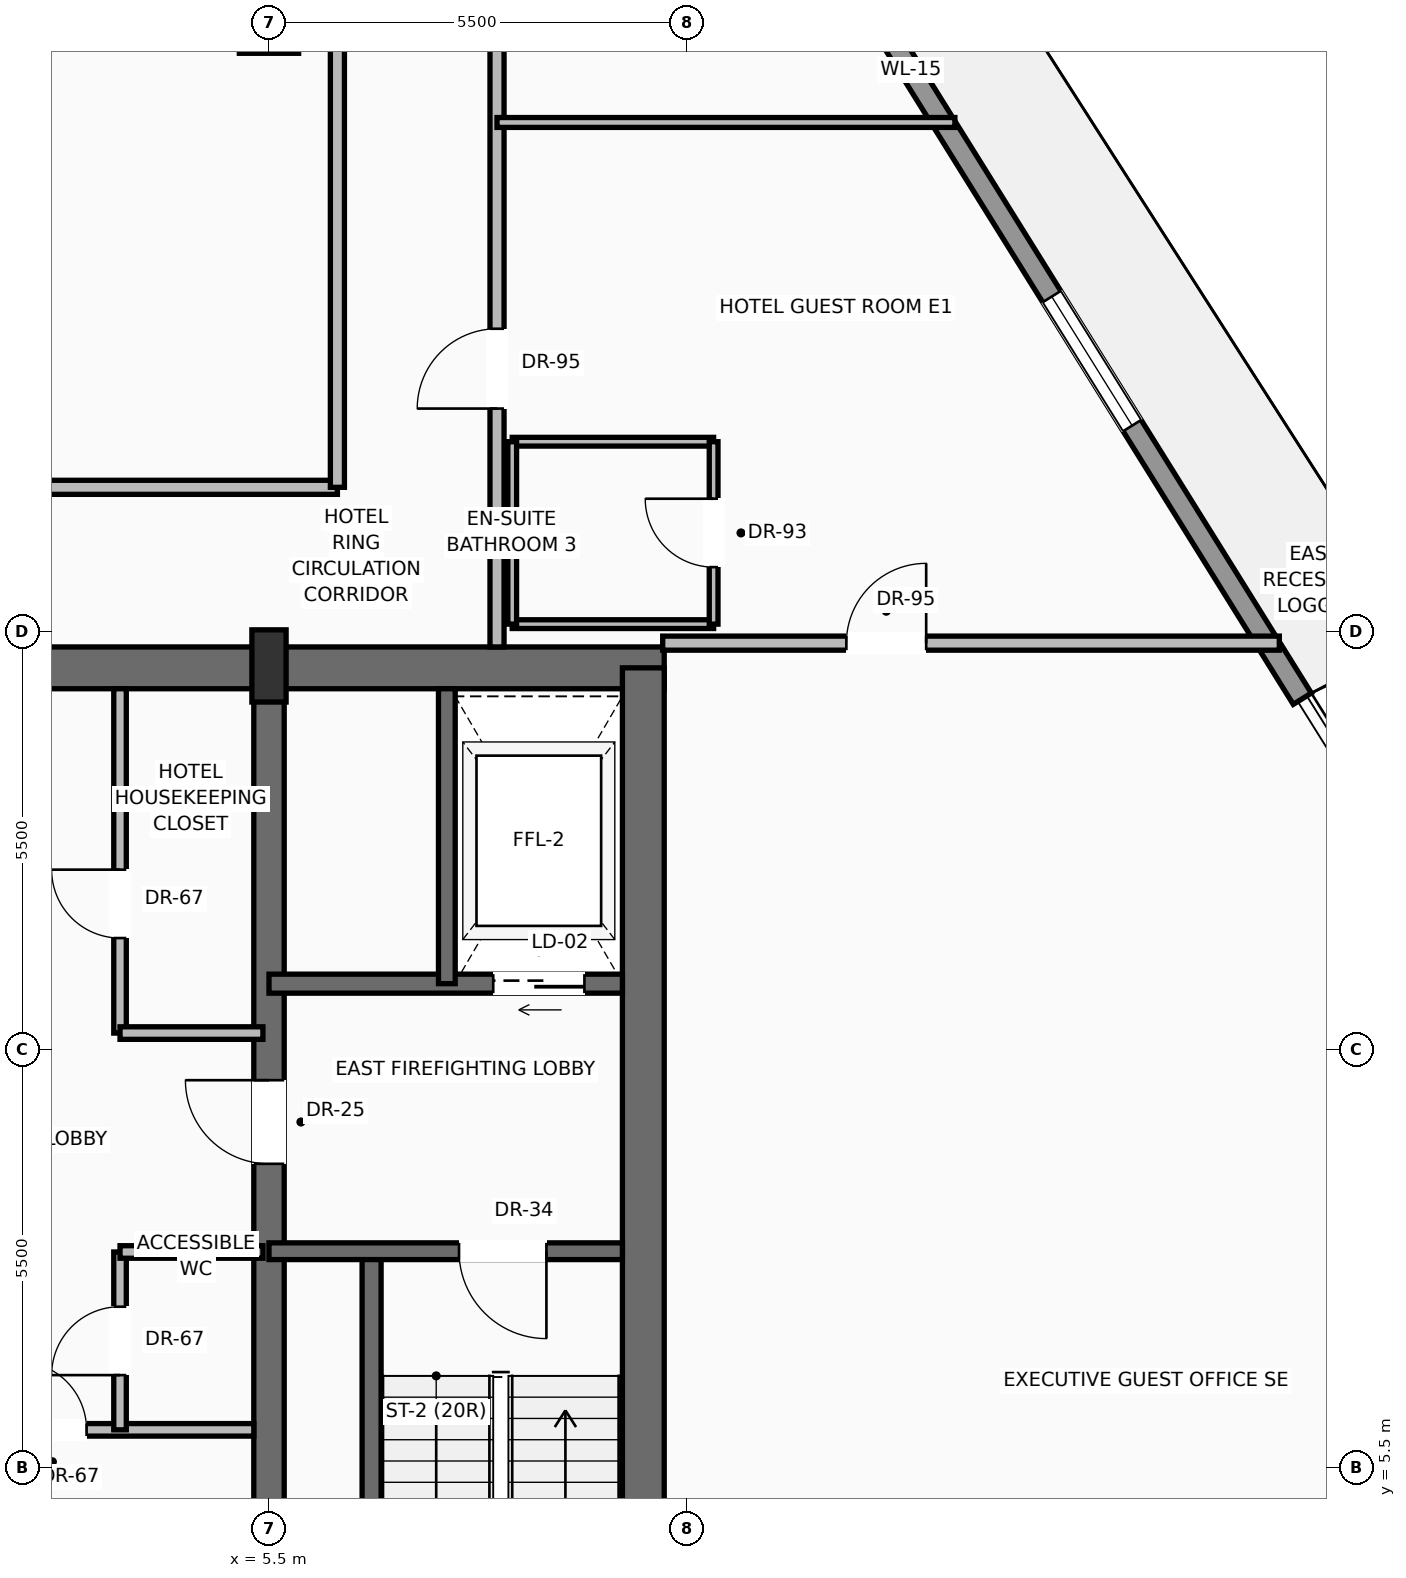
"""IFC4 building model, lengths in metres.
Left out: names, types, materials, properties, quantities, classifications, styles, units other than length and angle.
Written with IfcOpenShell. Run it as: python <this file> out.ifc"""

import sys

from ifc_helpers import new_model, si_unit, direction, frame, frame_2d, origin, origin_2d, place, context, subcontext, project, spatial, rectangle, extrude, source, transform, mapped, element, fill, save


model = new_model("IFC4")
c1 = context("Model", 3, precision=1e-05, world=origin(), true_north=direction((0.0, 1.0)))
c2 = subcontext(c1, "Body", "Model", "MODEL_VIEW")
j1 = project(units=[si_unit("LENGTHUNIT", "METRE"), si_unit("PLANEANGLEUNIT", "RADIAN")], contexts=[c1])
p1 = place(None, origin())
s1 = spatial("IfcSite", under=j1, at=p1, CompositionType="ELEMENT")
p2 = place(p1, origin())
s2 = spatial("IfcBuilding", under=s1, at=p2, CompositionType="ELEMENT")
p3 = place(p2, frame((0.0, 0.0, 226.9)))
s3 = spatial("IfcBuildingStorey", under=s2, at=p3, CompositionType="ELEMENT", Elevation=226.9)
p4 = place(p3, frame((-10.7, 16.025, 0.0), z_axis=(0.0, 0.0, 1.0), x_axis=(1.0, 0.0, 0.0)))
e1 = element("IfcWall", 1, at=p4, inside=s3, PredefinedType="SHEAR", context=c2, shape_type="SweptSolid", body=[
    extrude(rectangle(XDim=21.4, YDim=0.55, at=frame_2d((10.7, 0.0))), origin(), (0.0, 0.0, 1.0), 3.24),
])
p5 = place(p4, frame((3.27, 0.0, 0.0)))
e2 = element("IfcOpeningElement", 2, at=p5, cuts=e1, PredefinedType="OPENING", context=c2, shape_type="SweptSolid", body=[
    extrude(rectangle(XDim=1.3, YDim=2.3, at=frame_2d((0.65, 1.15))), frame((0.0, 0.285, 0.0), z_axis=(0.0, -1.0, 0.0), x_axis=(1.0, 0.0, 0.0)), (0.0, 0.0, 1.0), 0.57),
])
p6 = place(p4, frame((9.7, 0.0, 0.0)))
e3 = element("IfcOpeningElement", 3, at=p6, cuts=e1, PredefinedType="OPENING", context=c2, shape_type="SweptSolid", body=[
    extrude(rectangle(XDim=2.0, YDim=2.4, at=frame_2d((1.0, 1.2))), frame((0.0, 0.285, 0.0), z_axis=(0.0, -1.0, 0.0), x_axis=(1.0, 0.0, 0.0)), (0.0, 0.0, 1.0), 0.57),
])
p7 = place(p3, frame((10.425, 0.575, 0.0), z_axis=(0.0, 0.0, 1.0), x_axis=(0.0, 1.0, 0.0)))
e4 = element("IfcWall", 4, at=p7, inside=s3, PredefinedType="SHEAR", context=c2, shape_type="SweptSolid", body=[
    extrude(rectangle(XDim=15.45, YDim=0.55, at=frame_2d((7.725, 0.0))), origin(), (0.0, 0.0, 1.0), 3.24),
])
p8 = place(p3, frame((5.5, 0.575, 0.0), z_axis=(0.0, 0.0, 1.0), x_axis=(0.0, 1.0, 0.0)))
e5 = element("IfcWall", 5, at=p8, inside=s3, PredefinedType="SHEAR", context=c2, shape_type="SweptSolid", body=[
    extrude(rectangle(XDim=15.45, YDim=0.4, at=frame_2d((7.725, 0.0))), origin(), (0.0, 0.0, 1.0), 3.24),
])
p9 = place(p8, frame((8.925, 0.0, 0.0)))
e6 = element("IfcOpeningElement", 6, at=p9, cuts=e5, PredefinedType="OPENING", context=c2, shape_type="SweptSolid", body=[
    extrude(rectangle(XDim=1.1, YDim=2.2, at=frame_2d((0.55, 1.1))), frame((0.0, 0.21, 0.0), z_axis=(0.0, -1.0, 0.0), x_axis=(1.0, 0.0, 0.0)), (0.0, 0.0, 1.0), 0.42),
])
m1 = source(origin(), c2, "Body", "SweptSolid", [
    extrude(rectangle(XDim=0.45, YDim=0.95, at=origin_2d()), origin(), (0.0, 0.0, 1.0), 3.45),
])
p10 = place(p3, frame((5.5, 16.05, 0.0), z_axis=(0.0, 0.0, 1.0), x_axis=(1.0, 0.0, 0.0)))
e7 = element("IfcColumn", 7, at=p10, inside=s3, PredefinedType="PILASTER", context=c2, shape_type="MappedRepresentation", body=[
    mapped(m1, transform((0.0, 0.0, 0.0), scale=1.0)),
])
m2 = source(origin(), c2, "Body", "SweptSolid", [
    extrude(rectangle(XDim=0.78, YDim=0.78, at=origin_2d()), origin(), (0.0, 0.0, 1.0), 3.45),
])
p11 = place(p3, frame((5.5, 24.5, 0.0), z_axis=(0.0, 0.0, 1.0), x_axis=(1.0, 0.0, 0.0)))
e8 = element("IfcColumn", 8, at=p11, inside=s3, PredefinedType="COLUMN", context=c2, shape_type="MappedRepresentation", body=[
    mapped(m2, transform((0.0, 0.0, 0.0), scale=1.0)),
])
p12 = place(p3, frame((8.793, 32.152, 0.0), z_axis=(0.0, 0.0, 1.0), x_axis=(0.528841469928, -0.848720625226, 0.0)))
e9 = element("IfcWall", 9, at=p12, inside=s3, PredefinedType="SOLIDWALL", context=c2, shape_type="SweptSolid", body=[
    extrude(rectangle(XDim=19.48, YDim=0.28, at=frame_2d((9.74, 0.0))), origin(), (0.0, 0.0, 1.0), 2.82),
])
p13 = place(p12, frame((4.675, 0.0, 0.0)))
e10 = element("IfcOpeningElement", 10, at=p13, cuts=e9, PredefinedType="OPENING", context=c2, shape_type="SweptSolid", body=[
    extrude(rectangle(XDim=1.6, YDim=2.35, at=frame_2d((0.8, 1.175))), frame((0.0, 0.15, 0.0), z_axis=(0.0, -1.0, 0.0), x_axis=(1.0, 0.0, 0.0)), (0.0, 0.0, 1.0), 0.3),
])
p14 = place(p12, frame((13.246, 0.0, 0.9)))
e11 = element("IfcOpeningElement", 11, at=p14, cuts=e9, PredefinedType="OPENING", context=c2, shape_type="SweptSolid", body=[
    extrude(rectangle(XDim=2.0, YDim=1.75, at=frame_2d((1.0, 0.875))), frame((0.0, 0.15, 0.0), z_axis=(0.0, -1.0, 0.0), x_axis=(1.0, 0.0, 0.0)), (0.0, 0.0, 1.0), 0.3),
])
p15 = place(p3, frame((6.85, 0.85, 0.0), z_axis=(0.0, 0.0, 1.0), x_axis=(0.0, 1.0, 0.0)))
e12 = element("IfcWall", 12, at=p15, inside=s3, PredefinedType="SOLIDWALL", context=c2, shape_type="SweptSolid", body=[
    extrude(rectangle(XDim=7.5, YDim=0.25, at=frame_2d((3.75, 0.0))), origin(), (0.0, 0.0, 1.0), 3.24),
])
p16 = place(p3, frame((10.15, 8.35, 0.0), z_axis=(0.0, 0.0, 1.0), x_axis=(-1.0, 0.0, 0.0)))
e13 = element("IfcWall", 13, at=p16, inside=s3, PredefinedType="SOLIDWALL", context=c2, shape_type="SweptSolid", body=[
    extrude(rectangle(XDim=4.65, YDim=0.22, at=frame_2d((2.325, 0.0))), origin(), (0.0, 0.0, 1.0), 3.24),
])
p17 = place(p16, frame((1.0, 0.0, 0.0)))
e14 = element("IfcOpeningElement", 14, at=p17, cuts=e13, PredefinedType="OPENING", context=c2, shape_type="SweptSolid", body=[
    extrude(rectangle(XDim=1.15, YDim=2.2, at=frame_2d((0.575, 1.1))), frame((0.0, 0.12, 0.0), z_axis=(0.0, -1.0, 0.0), x_axis=(1.0, 0.0, 0.0)), (0.0, 0.0, 1.0), 0.24),
])
p18 = place(p3, frame((10.15, 11.87, 0.0), z_axis=(0.0, 0.0, 1.0), x_axis=(-1.0, 0.0, 0.0)))
e15 = element("IfcWall", 15, at=p18, inside=s3, PredefinedType="SOLIDWALL", context=c2, shape_type="SweptSolid", body=[
    extrude(rectangle(XDim=4.65, YDim=0.25, at=frame_2d((2.325, 0.0))), origin(), (0.0, 0.0, 1.0), 3.24),
])
p19 = place(p18, frame((0.5, 0.0, 0.0)))
e16 = element("IfcOpeningElement", 16, at=p19, cuts=e15, PredefinedType="OPENING", context=c2, shape_type="SweptSolid", body=[
    extrude(rectangle(XDim=1.2, YDim=2.25, at=frame_2d((0.6, 1.125))), frame((0.0, 0.135, 0.0), z_axis=(0.0, -1.0, 0.0), x_axis=(1.0, 0.0, 0.0)), (0.0, 0.0, 1.0), 0.27),
])
p20 = place(p3, frame((7.84, 11.87, 0.0), z_axis=(0.0, 0.0, 1.0), x_axis=(0.0, 1.0, 0.0)))
e17 = element("IfcWall", 17, at=p20, inside=s3, PredefinedType="SOLIDWALL", context=c2, shape_type="SweptSolid", body=[
    extrude(rectangle(XDim=3.88, YDim=0.22, at=frame_2d((1.94, 0.0))), origin(), (0.0, 0.0, 1.0), 3.24),
])
p21 = place(p3, frame((-5.5, 6.0, 0.0), z_axis=(0.0, 0.0, 1.0), x_axis=(1.0, 0.0, 0.0)))
e18 = element("IfcWall", 18, at=p21, inside=s3, PredefinedType="PARTITIONING", context=c2, shape_type="SweptSolid", body=[
    extrude(rectangle(XDim=10.8, YDim=0.165, at=frame_2d((5.4, 0.0))), origin(), (0.0, 0.0, 1.0), 3.232),
])
p22 = place(p21, frame((7.7, 0.0, 0.0)))
e19 = element("IfcOpeningElement", 19, at=p22, cuts=e18, PredefinedType="OPENING", context=c2, shape_type="SweptSolid", body=[
    extrude(rectangle(XDim=0.9, YDim=2.1, at=frame_2d((0.45, 1.05))), frame((0.0, 0.093, 0.0), z_axis=(0.0, -1.0, 0.0), x_axis=(1.0, 0.0, 0.0)), (0.0, 0.0, 1.0), 0.185),
])
p23 = place(p3, frame((3.54, 6.0, 0.0), z_axis=(0.0, 0.0, 1.0), x_axis=(0.0, 1.0, 0.0)))
e20 = element("IfcWall", 20, at=p23, inside=s3, PredefinedType="PARTITIONING", context=c2, shape_type="SweptSolid", body=[
    extrude(rectangle(XDim=2.34, YDim=0.165, at=frame_2d((1.17, 0.0))), origin(), (0.0, 0.0, 1.0), 3.232),
])
p24 = place(p23, frame((0.72, 0.0, 0.0)))
e21 = element("IfcOpeningElement", 21, at=p24, cuts=e20, PredefinedType="OPENING", context=c2, shape_type="SweptSolid", body=[
    extrude(rectangle(XDim=0.9, YDim=2.1, at=frame_2d((0.45, 1.05))), frame((0.0, 0.093, 0.0), z_axis=(0.0, -1.0, 0.0), x_axis=(1.0, 0.0, 0.0)), (0.0, 0.0, 1.0), 0.185),
])
p25 = place(p3, frame((3.54, 8.34, 0.0), z_axis=(0.0, 0.0, 1.0), x_axis=(1.0, 0.0, 0.0)))
e22 = element("IfcWall", 22, at=p25, inside=s3, PredefinedType="PARTITIONING", context=c2, shape_type="SweptSolid", body=[
    extrude(rectangle(XDim=1.88, YDim=0.165, at=frame_2d((0.94, 0.0))), origin(), (0.0, 0.0, 1.0), 3.232),
])
p26 = place(p3, frame((3.54, 11.22, 0.0), z_axis=(0.0, 0.0, 1.0), x_axis=(0.0, 1.0, 0.0)))
e23 = element("IfcWall", 23, at=p26, inside=s3, PredefinedType="PARTITIONING", context=c2, shape_type="SweptSolid", body=[
    extrude(rectangle(XDim=4.53, YDim=0.165, at=frame_2d((2.265, 0.0))), origin(), (0.0, 0.0, 1.0), 3.232),
])
p27 = place(p26, frame((1.25, 0.0, 0.0)))
e24 = element("IfcOpeningElement", 24, at=p27, cuts=e23, PredefinedType="OPENING", context=c2, shape_type="SweptSolid", body=[
    extrude(rectangle(XDim=0.9, YDim=2.1, at=frame_2d((0.45, 1.05))), frame((0.0, 0.093, 0.0), z_axis=(0.0, -1.0, 0.0), x_axis=(1.0, 0.0, 0.0)), (0.0, 0.0, 1.0), 0.185),
])
p28 = place(p3, frame((3.54, 11.22, 0.0), z_axis=(0.0, 0.0, 1.0), x_axis=(1.0, 0.0, 0.0)))
e25 = element("IfcWall", 25, at=p28, inside=s3, PredefinedType="PARTITIONING", context=c2, shape_type="SweptSolid", body=[
    extrude(rectangle(XDim=1.88, YDim=0.165, at=frame_2d((0.94, 0.0))), origin(), (0.0, 0.0, 1.0), 3.232),
])
p29 = place(p3, frame((-6.4, 18.4, 0.0), z_axis=(0.0, 0.0, 1.0), x_axis=(1.0, 0.0, 0.0)))
e26 = element("IfcWall", 26, at=p29, inside=s3, PredefinedType="PARTITIONING", context=c2, shape_type="SweptSolid", body=[
    extrude(rectangle(XDim=12.8, YDim=0.185, at=frame_2d((6.4, 0.0))), origin(), (0.0, 0.0, 1.0), 3.232),
])
p30 = place(p29, frame((5.925, 0.0, 0.0)))
e27 = element("IfcOpeningElement", 27, at=p30, cuts=e26, PredefinedType="OPENING", context=c2, shape_type="SweptSolid", body=[
    extrude(rectangle(XDim=0.95, YDim=2.2, at=frame_2d((0.475, 1.1))), frame((0.0, 0.103, 0.0), z_axis=(0.0, -1.0, 0.0), x_axis=(1.0, 0.0, 0.0)), (0.0, 0.0, 1.0), 0.205),
])
p31 = place(p3, frame((6.4, 18.4, 0.0), z_axis=(0.0, 0.0, 1.0), x_axis=(0.0, 1.0, 0.0)))
e28 = element("IfcWall", 28, at=p31, inside=s3, PredefinedType="PARTITIONING", context=c2, shape_type="SweptSolid", body=[
    extrude(rectangle(XDim=9.1, YDim=0.185, at=frame_2d((4.55, 0.0))), origin(), (0.0, 0.0, 1.0), 3.232),
])
p32 = place(p3, frame((8.5, 16.3, 0.0), z_axis=(0.0, 0.0, 1.0), x_axis=(0.0, 1.0, 0.0)))
e29 = element("IfcWall", 29, at=p32, inside=s3, PredefinedType="PARTITIONING", context=c2, shape_type="SweptSolid", body=[
    extrude(rectangle(XDim=13.3, YDim=0.185, at=frame_2d((6.65, 0.0))), origin(), (0.0, 0.0, 1.0), 3.232),
])
p33 = place(p32, frame((3.136, 0.0, 0.0)))
e30 = element("IfcOpeningElement", 30, at=p33, cuts=e29, PredefinedType="OPENING", context=c2, shape_type="SweptSolid", body=[
    extrude(rectangle(XDim=1.05, YDim=2.25, at=frame_2d((0.525, 1.125))), frame((0.0, 0.103, 0.0), z_axis=(0.0, -1.0, 0.0), x_axis=(1.0, 0.0, 0.0)), (0.0, 0.0, 1.0), 0.205),
])
p34 = place(p32, frame((9.636, 0.0, 0.0)))
e31 = element("IfcOpeningElement", 31, at=p34, cuts=e29, PredefinedType="OPENING", context=c2, shape_type="SweptSolid", body=[
    extrude(rectangle(XDim=1.05, YDim=2.25, at=frame_2d((0.525, 1.125))), frame((0.0, 0.103, 0.0), z_axis=(0.0, -1.0, 0.0), x_axis=(1.0, 0.0, 0.0)), (0.0, 0.0, 1.0), 0.205),
])
p35 = place(p3, frame((10.68, 16.35, 0.0), z_axis=(0.0, 0.0, 1.0), x_axis=(1.0, 0.0, 0.0)))
e32 = element("IfcWall", 32, at=p35, inside=s3, PredefinedType="PARTITIONING", context=c2, shape_type="SweptSolid", body=[
    extrude(rectangle(XDim=8.113, YDim=0.185, at=frame_2d((4.056, 0.0))), origin(), (0.0, 0.0, 1.0), 3.232),
])
p36 = place(p35, frame((2.417, 0.0, 0.0)))
e33 = element("IfcOpeningElement", 33, at=p36, cuts=e32, PredefinedType="OPENING", context=c2, shape_type="SweptSolid", body=[
    extrude(rectangle(XDim=1.05, YDim=2.25, at=frame_2d((0.525, 1.125))), frame((0.0, 0.103, 0.0), z_axis=(0.0, -1.0, 0.0), x_axis=(1.0, 0.0, 0.0)), (0.0, 0.0, 1.0), 0.205),
])
for number, where, z_axis, x_axis in (
    (34, (8.7, 16.6, 0.0), (0.0, 0.0, 1.0), (1.0, 0.0, 0.0)),
    (35, (8.7, 19.0, 0.0), (0.0, 0.0, 1.0), (1.0, 0.0, 0.0)),
):
    element("IfcWall", number, at=place(p3, frame(where, z_axis=z_axis, x_axis=x_axis)), inside=s3, PredefinedType="PARTITIONING", context=c2, shape_type="SweptSolid", body=[
        extrude(rectangle(XDim=2.65, YDim=0.115, at=frame_2d((1.325, 0.0))), origin(), (0.0, 0.0, 1.0), 3.232),
    ])
p37 = place(p3, frame((8.7, 16.6, 0.0), z_axis=(0.0, 0.0, 1.0), x_axis=(0.0, 1.0, 0.0)))
e36 = element("IfcWall", 36, at=p37, inside=s3, PredefinedType="PARTITIONING", context=c2, shape_type="SweptSolid", body=[
    extrude(rectangle(XDim=2.4, YDim=0.115, at=frame_2d((1.2, 0.0))), origin(), (0.0, 0.0, 1.0), 3.232),
])
p38 = place(p3, frame((11.35, 16.6, 0.0), z_axis=(0.0, 0.0, 1.0), x_axis=(0.0, 1.0, 0.0)))
e37 = element("IfcWall", 37, at=p38, inside=s3, PredefinedType="PARTITIONING", context=c2, shape_type="SweptSolid", body=[
    extrude(rectangle(XDim=2.4, YDim=0.115, at=frame_2d((1.2, 0.0))), origin(), (0.0, 0.0, 1.0), 3.232),
])
p39 = place(p38, frame((0.75, 0.0, 0.0)))
e38 = element("IfcOpeningElement", 38, at=p39, cuts=e37, PredefinedType="OPENING", context=c2, shape_type="SweptSolid", body=[
    extrude(rectangle(XDim=0.9, YDim=2.15, at=frame_2d((0.45, 1.075))), frame((0.0, 0.067, 0.0), z_axis=(0.0, -1.0, 0.0), x_axis=(1.0, 0.0, 0.0)), (0.0, 0.0, 1.0), 0.135),
])
p40 = place(p3, frame((8.5, 23.2, 0.0), z_axis=(0.0, 0.0, 1.0), x_axis=(1.0, 0.0, 0.0)))
e39 = element("IfcWall", 39, at=p40, inside=s3, PredefinedType="PARTITIONING", context=c2, shape_type="SweptSolid", body=[
    extrude(rectangle(XDim=6.024, YDim=0.13, at=frame_2d((3.012, 0.0))), origin(), (0.0, 0.0, 1.0), 3.232),
])
m3 = source(origin(), c2, "Body", "SweptSolid", [
    extrude(rectangle(XDim=2.0, YDim=1.75, at=frame_2d((1.0, 0.875))), frame((0.0, 0.03, 0.0), z_axis=(0.0, -1.0, 0.0), x_axis=(1.0, 0.0, 0.0)), (0.0, 0.0, 1.0), 0.06),
])
p41 = place(p14, origin())
e40 = element("IfcWindow", 40, at=p41, inside=s3, PartitioningType="SINGLE_PANEL", PredefinedType="WINDOW", context=c2, shape_type="MappedRepresentation", body=[
    mapped(m3, transform((0.0, 0.0, 0.0), scale=1.0)),
])
fill(e11, e40)
m4 = source(origin(), c2, "Body", "SweptSolid", [
    extrude(rectangle(XDim=1.15, YDim=2.2, at=frame_2d((0.575, 1.1))), frame((0.0, 0.025, 0.0), z_axis=(0.0, -1.0, 0.0), x_axis=(1.0, 0.0, 0.0)), (0.0, 0.0, 1.0), 0.05),
])
p42 = place(p17, origin())
e41 = element("IfcDoor", 41, at=p42, inside=s3, OperationType="SINGLE_SWING_LEFT", PredefinedType="DOOR", context=c2, shape_type="MappedRepresentation", body=[
    mapped(m4, transform((0.0, 0.0, 0.0), scale=1.0)),
])
fill(e14, e41)
m5 = source(origin(), c2, "Body", "SweptSolid", [
    extrude(rectangle(XDim=1.1, YDim=2.2, at=frame_2d((0.55, 1.1))), frame((0.0, 0.025, 0.0), z_axis=(0.0, -1.0, 0.0), x_axis=(1.0, 0.0, 0.0)), (0.0, 0.0, 1.0), 0.05),
])
p43 = place(p9, origin())
e42 = element("IfcDoor", 42, at=p43, inside=s3, OperationType="SINGLE_SWING_RIGHT", PredefinedType="DOOR", context=c2, shape_type="MappedRepresentation", body=[
    mapped(m5, transform((0.0, 0.0, 0.0), scale=1.0)),
])
fill(e6, e42)
m6 = source(origin(), c2, "Body", "SweptSolid", [
    extrude(rectangle(XDim=1.2, YDim=2.25, at=frame_2d((0.6, 1.125))), frame((0.0, 0.025, 0.0), z_axis=(0.0, -1.0, 0.0), x_axis=(1.0, 0.0, 0.0)), (0.0, 0.0, 1.0), 0.05),
])
p44 = place(p19, origin())
e43 = element("IfcDoor", 43, at=p44, inside=s3, OperationType="SLIDING_TO_RIGHT", PredefinedType="DOOR", context=c2, shape_type="MappedRepresentation", body=[
    mapped(m6, transform((0.0, 0.0, 0.0), scale=1.0)),
])
fill(e16, e43)
m7 = source(origin(), c2, "Body", "SweptSolid", [
    extrude(rectangle(XDim=0.9, YDim=2.1, at=frame_2d((0.45, 1.05))), frame((0.0, 0.025, 0.0), z_axis=(0.0, -1.0, 0.0), x_axis=(1.0, 0.0, 0.0)), (0.0, 0.0, 1.0), 0.05),
])
p45 = place(p22, origin())
e44 = element("IfcDoor", 44, at=p45, inside=s3, OperationType="SINGLE_SWING_LEFT", PredefinedType="DOOR", context=c2, shape_type="MappedRepresentation", body=[
    mapped(m7, transform((0.0, 0.0, 0.0), scale=1.0)),
])
fill(e19, e44)
p46 = place(p24, origin())
e45 = element("IfcDoor", 45, at=p46, inside=s3, OperationType="SINGLE_SWING_LEFT", PredefinedType="DOOR", context=c2, shape_type="MappedRepresentation", body=[
    mapped(m7, transform((0.0, 0.0, 0.0), scale=1.0)),
])
fill(e21, e45)
p47 = place(p27, origin())
e46 = element("IfcDoor", 46, at=p47, inside=s3, OperationType="SINGLE_SWING_RIGHT", PredefinedType="DOOR", context=c2, shape_type="MappedRepresentation", body=[
    mapped(m7, transform((0.0, 0.0, 0.0), scale=1.0)),
])
fill(e24, e46)
m8 = source(origin(), c2, "Body", "SweptSolid", [
    extrude(rectangle(XDim=1.05, YDim=2.25, at=frame_2d((0.525, 1.125))), frame((0.0, 0.025, 0.0), z_axis=(0.0, -1.0, 0.0), x_axis=(1.0, 0.0, 0.0)), (0.0, 0.0, 1.0), 0.05),
])
p48 = place(p36, origin())
e47 = element("IfcDoor", 47, at=p48, inside=s3, OperationType="SINGLE_SWING_RIGHT", PredefinedType="DOOR", context=c2, shape_type="MappedRepresentation", body=[
    mapped(m8, transform((0.0, 0.0, 0.0), scale=1.0)),
])
fill(e33, e47)
m9 = source(origin(), c2, "Body", "SweptSolid", [
    extrude(rectangle(XDim=0.9, YDim=2.15, at=frame_2d((0.45, 1.075))), frame((0.0, 0.025, 0.0), z_axis=(0.0, -1.0, 0.0), x_axis=(1.0, 0.0, 0.0)), (0.0, 0.0, 1.0), 0.05),
])
p49 = place(p39, origin())
e48 = element("IfcDoor", 48, at=p49, inside=s3, OperationType="SINGLE_SWING_RIGHT", PredefinedType="DOOR", context=c2, shape_type="MappedRepresentation", body=[
    mapped(m9, transform((0.0, 0.0, 0.0), scale=1.0)),
])
fill(e38, e48)
p50 = place(p33, origin())
e49 = element("IfcDoor", 49, at=p50, inside=s3, OperationType="SINGLE_SWING_LEFT", PredefinedType="DOOR", context=c2, shape_type="MappedRepresentation", body=[
    mapped(m8, transform((0.0, 0.0, 0.0), scale=1.0)),
])
fill(e30, e49)
save(model, sys.argv[1])
